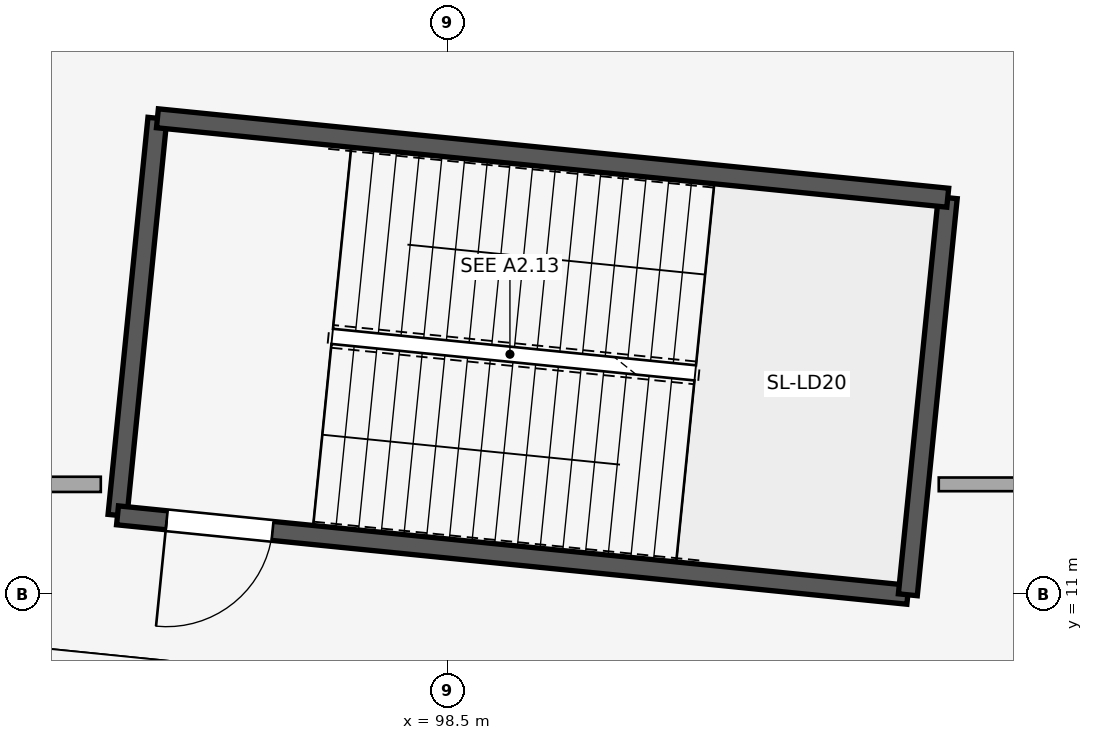
"""IFC4 building model, lengths in metres.
Left out: names, types, materials, properties, quantities, classifications, styles, units other than length and angle.
Written with IfcOpenShell. Run it as: python <this file> out.ifc"""

import sys

from ifc_helpers import new_model, si_unit, direction, frame, frame_2d, origin, place, context, subcontext, project, spatial, rectangle, extrude, element, fill, save


model = new_model("IFC4")
c1 = context("Model", 3, precision=1e-05, world=origin(), true_north=direction((0.0, 1.0)))
c2 = subcontext(c1, "Body", "Model", "MODEL_VIEW")
j1 = project(units=[si_unit("LENGTHUNIT", "METRE"), si_unit("PLANEANGLEUNIT", "RADIAN")], contexts=[c1])
p1 = place(None, origin())
s1 = spatial("IfcSite", under=j1, at=p1, CompositionType="ELEMENT")
p2 = place(p1, origin())
s2 = spatial("IfcBuilding", under=s1, at=p2, CompositionType="ELEMENT")
p3 = place(p2, origin())
s3 = spatial("IfcBuildingStorey", under=s2, at=p3, CompositionType="ELEMENT", Elevation=0.0)
p4 = place(p3, frame((94.681, 17.266, 0.0), z_axis=(0.0, 0.0, 1.0), x_axis=(-0.10002396577, -0.994985028165, 0.0)))
e1 = element("IfcWall", 1, at=p4, inside=s3, PredefinedType="SHEAR", context=c2, shape_type="SweptSolid", body=[
    extrude(rectangle(XDim=5.25, YDim=0.25, at=frame_2d((2.625, 0.0))), origin(), (0.0, 0.0, 1.0), 4.94),
])
p5 = place(p3, frame((94.156, 12.042, 0.0), z_axis=(0.0, 0.0, 1.0), x_axis=(0.994988263568, -0.09999177647, 0.0)))
e2 = element("IfcWall", 2, at=p5, inside=s3, PredefinedType="SHEAR", context=c2, shape_type="SweptSolid", body=[
    extrude(rectangle(XDim=10.45, YDim=0.25, at=frame_2d((5.225, 0.0))), origin(), (0.0, 0.0, 1.0), 4.94),
])
p6 = place(p5, frame((0.65, 0.0, 0.0)))
e3 = element("IfcOpeningElement", 3, at=p6, cuts=e2, PredefinedType="OPENING", context=c2, shape_type="SweptSolid", body=[
    extrude(rectangle(XDim=1.4, YDim=2.2, at=frame_2d((0.7, 1.1))), frame((0.0, 0.135, 0.0), z_axis=(0.0, -1.0, 0.0), x_axis=(1.0, 0.0, 0.0)), (0.0, 0.0, 1.0), 0.27),
])
p7 = place(p3, frame((104.553, 10.997, 0.0), z_axis=(0.0, 0.0, 1.0), x_axis=(0.099982555566, 0.994989190184, 0.0)))
e4 = element("IfcWall", 4, at=p7, inside=s3, PredefinedType="SHEAR", context=c2, shape_type="SweptSolid", body=[
    extrude(rectangle(XDim=5.25, YDim=0.25, at=frame_2d((2.625, 0.0))), origin(), (0.0, 0.0, 1.0), 4.94),
])
p8 = place(p3, frame((105.078, 16.221, 0.0), z_axis=(0.0, 0.0, 1.0), x_axis=(-0.994985705245, 0.100017230303, 0.0)))
e5 = element("IfcWall", 5, at=p8, inside=s3, PredefinedType="SHEAR", context=c2, shape_type="SweptSolid", body=[
    extrude(rectangle(XDim=10.45, YDim=0.25, at=frame_2d((5.225, 0.0))), origin(), (0.0, 0.0, 1.0), 4.94),
])
p9 = place(p3, frame((74.585, 12.45, 0.0), z_axis=(0.0, 0.0, 1.0), x_axis=(1.0, 0.0, 0.0)))
e6 = element("IfcWall", 6, at=p9, inside=s3, PredefinedType="PARTITIONING", context=c2, shape_type="SweptSolid", body=[
    extrude(rectangle(XDim=19.351, YDim=0.2, at=frame_2d((9.675, 0.0))), origin(), (0.0, 0.0, 1.0), 3.69),
])
p10 = place(p9, frame((16.5, 0.0, 0.0)))
e7 = element("IfcOpeningElement", 7, at=p10, cuts=e6, PredefinedType="OPENING", context=c2, shape_type="SweptSolid", body=[
    extrude(rectangle(XDim=1.56, YDim=2.24, at=frame_2d((0.78, 1.12))), frame((0.0, 0.11, 0.0), z_axis=(0.0, -1.0, 0.0), x_axis=(1.0, 0.0, 0.0)), (0.0, 0.0, 1.0), 0.22),
])
p11 = place(p3, frame((104.96, 12.45, 0.0), z_axis=(0.0, 0.0, 1.0), x_axis=(1.0, 0.0, 0.0)))
e8 = element("IfcWall", 8, at=p11, inside=s3, PredefinedType="PARTITIONING", context=c2, shape_type="SweptSolid", body=[
    extrude(rectangle(XDim=12.079, YDim=0.18, at=frame_2d((6.04, 0.0))), origin(), (0.0, 0.0, 1.0), 3.69),
])
p12 = place(p11, frame((8.729, 0.0, 0.0)))
e9 = element("IfcOpeningElement", 9, at=p12, cuts=e8, PredefinedType="OPENING", context=c2, shape_type="SweptSolid", body=[
    extrude(rectangle(XDim=1.56, YDim=2.38, at=frame_2d((0.78, 1.19))), frame((0.0, 0.1, 0.0), z_axis=(0.0, -1.0, 0.0), x_axis=(1.0, 0.0, 0.0)), (0.0, 0.0, 1.0), 0.2),
])
p13 = place(p6, frame((1.4, 0.0, 0.0), z_axis=(0.0, 0.0, 1.0), x_axis=(-1.0, 0.0, 0.0)))
e10 = element("IfcDoor", 10, at=p13, inside=s3, OperationType="SINGLE_SWING_RIGHT", PredefinedType="DOOR", context=c2, shape_type="SweptSolid", body=[
    extrude(rectangle(XDim=1.4, YDim=2.2, at=frame_2d((0.7, 1.1))), frame((0.0, 0.025, 0.0), z_axis=(0.0, -1.0, 0.0), x_axis=(1.0, 0.0, 0.0)), (0.0, 0.0, 1.0), 0.05),
])
fill(e3, e10)
save(model, sys.argv[1])
